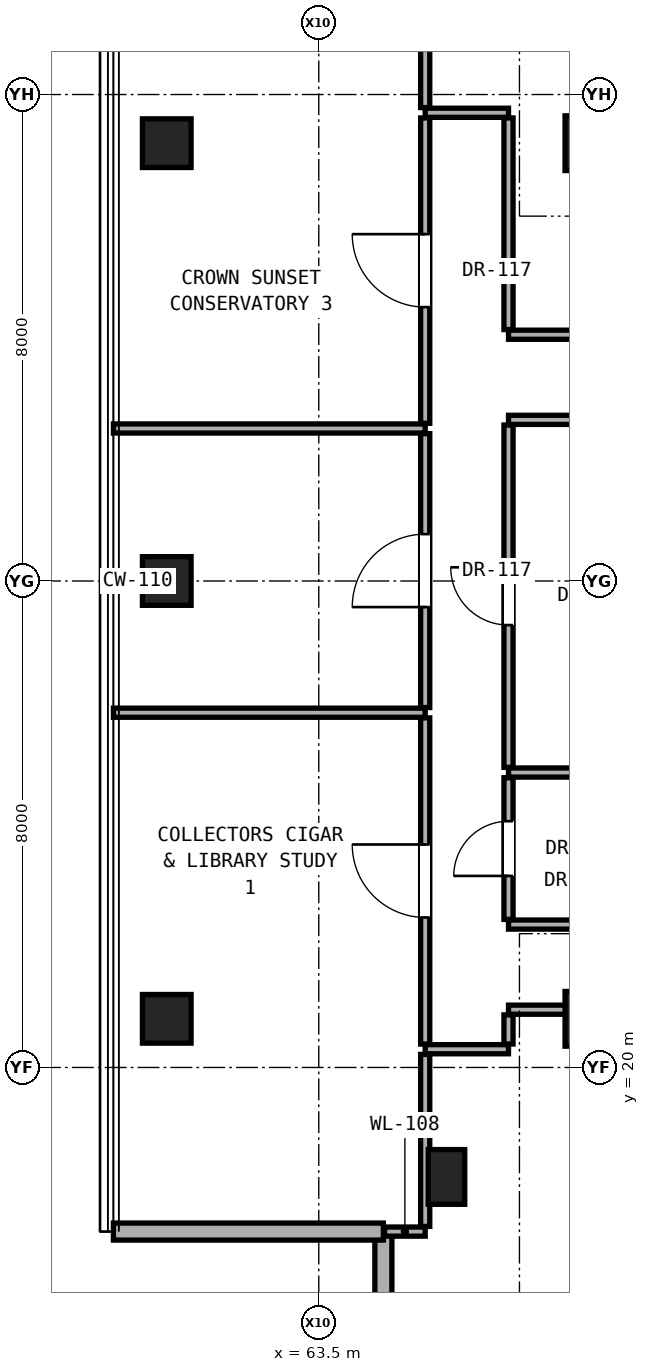
"""IFC4 building model, lengths in metres.
Left out: names, types, materials, properties, quantities, classifications, styles, units other than length and angle.
Written with IfcOpenShell. Run it as: python <this file> out.ifc"""

import sys

from ifc_helpers import new_model, si_unit, direction, frame, frame_2d, origin, origin_2d, place, context, subcontext, project, spatial, rectangle, hollow_rectangle, extrude, element, fill, save


model = new_model("IFC4")
c1 = context("Model", 3, precision=1e-05, world=origin(), true_north=direction((0.0, 1.0)))
c2 = subcontext(c1, "Body", "Model", "MODEL_VIEW")
j1 = project(units=[si_unit("LENGTHUNIT", "METRE"), si_unit("PLANEANGLEUNIT", "RADIAN")], contexts=[c1])
p1 = place(None, origin())
s1 = spatial("IfcSite", under=j1, at=p1, CompositionType="ELEMENT")
p2 = place(p1, origin())
s2 = spatial("IfcBuilding", under=s1, at=p2, CompositionType="ELEMENT")
p3 = place(p2, frame((0.0, 0.0, 206.4)))
s3 = spatial("IfcBuildingStorey", under=s2, at=p3, CompositionType="ELEMENT", Elevation=206.4)
for number, where, z_axis, x_axis in (
    (1, (68.0, 20.8, 0.0), (0.0, 0.0, 1.0), (1.0, 0.0, 0.0)),
    (2, (68.0, 35.2, 0.0), (0.0, 0.0, 1.0), (1.0, 0.0, 0.0)),
):
    element("IfcColumn", number, at=place(p3, frame(where, z_axis=z_axis, x_axis=x_axis)), inside=s3, PredefinedType="COLUMN", context=c2, shape_type="SweptSolid", body=[
        extrude(rectangle(XDim=0.9, YDim=0.9, at=origin_2d()), origin(), (0.0, 0.0, 1.0), 3.25),
    ])
for number, where, z_axis, x_axis in (
    (3, (61.0, 20.8, 0.0), (0.0, 0.0, 1.0), (1.0, 0.0, 0.0)),
    (4, (61.0, 28.0, 0.0), (0.0, 0.0, 1.0), (1.0, 0.0, 0.0)),
    (5, (61.0, 35.2, 0.0), (0.0, 0.0, 1.0), (1.0, 0.0, 0.0)),
):
    element("IfcColumn", number, at=place(p3, frame(where, z_axis=z_axis, x_axis=x_axis)), inside=s3, PredefinedType="COLUMN", context=c2, shape_type="SweptSolid", body=[
        extrude(hollow_rectangle(XDim=0.8, YDim=0.8, WallThickness=0.045, at=origin_2d()), origin(), (0.0, 0.0, 1.0), 3.25),
    ])
p4 = place(p3, frame((65.6, 18.2, 0.0), z_axis=(0.0, 0.0, 1.0), x_axis=(1.0, 0.0, 0.0)))
e6 = element("IfcColumn", 6, at=p4, inside=s3, PredefinedType="PILASTER", context=c2, shape_type="SweptSolid", body=[
    extrude(rectangle(XDim=0.6, YDim=0.9, at=origin_2d()), origin(), (0.0, 0.0, 1.0), 3.25),
])
for number, where, z_axis, x_axis in (
    (7, (64.562, 17.301, 0.0), (0.0, 0.0, 1.0), (0.0, -1.0, 0.0)),
    (8, (60.123, 17.301, 0.0), (0.0, 0.0, 1.0), (1.0, 0.0, 0.0)),
):
    element("IfcWall", number, at=place(p3, frame(where, z_axis=z_axis, x_axis=x_axis)), inside=s3, PredefinedType="SOLIDWALL", context=c2, shape_type="SweptSolid", body=[
        extrude(rectangle(XDim=4.44, YDim=0.28, at=frame_2d((2.22, 0.0))), origin(), (0.0, 0.0, 1.0), 2.58),
    ])
p5 = place(p3, frame((64.582, 17.301, 0.0), z_axis=(0.0, 0.0, 1.0), x_axis=(1.0, 0.0, 0.0)))
e9 = element("IfcWall", 9, at=p5, inside=s3, PredefinedType="PARTITIONING", context=c2, shape_type="SweptSolid", body=[
    extrude(rectangle(XDim=0.668, YDim=0.15, at=frame_2d((0.334, 0.0))), origin(), (0.0, 0.0, 1.0), 2.6),
])
p6 = place(p3, frame((65.25, 20.3, 0.0), z_axis=(0.0, 0.0, 1.0), x_axis=(1.0, 0.0, 0.0)))
e10 = element("IfcWall", 10, at=p6, inside=s3, PredefinedType="PARTITIONING", context=c2, shape_type="SweptSolid", body=[
    extrude(rectangle(XDim=1.37, YDim=0.15, at=frame_2d((0.685, 0.0))), origin(), (0.0, 0.0, 1.0), 2.6),
])
p7 = place(p3, frame((66.62, 20.95, 0.0), z_axis=(0.0, 0.0, 1.0), x_axis=(1.0, 0.0, 0.0)))
e11 = element("IfcWall", 11, at=p7, inside=s3, PredefinedType="PARTITIONING", context=c2, shape_type="SweptSolid", body=[
    extrude(rectangle(XDim=1.16, YDim=0.15, at=frame_2d((0.58, 0.0))), origin(), (0.0, 0.0, 1.0), 2.262),
])
p8 = place(p3, frame((66.62, 22.35, 0.0), z_axis=(0.0, 0.0, 1.0), x_axis=(1.0, 0.0, 0.0)))
e12 = element("IfcWall", 12, at=p8, inside=s3, PredefinedType="PARTITIONING", context=c2, shape_type="SweptSolid", body=[
    extrude(rectangle(XDim=10.14, YDim=0.15, at=frame_2d((5.07, 0.0))), origin(), (0.0, 0.0, 1.0), 2.175),
])
p9 = place(p3, frame((66.62, 24.85, 0.0), z_axis=(0.0, 0.0, 1.0), x_axis=(1.0, 0.0, 0.0)))
e13 = element("IfcWall", 13, at=p9, inside=s3, PredefinedType="PARTITIONING", context=c2, shape_type="SweptSolid", body=[
    extrude(rectangle(XDim=3.13, YDim=0.15, at=frame_2d((1.565, 0.0))), origin(), (0.0, 0.0, 1.0), 2.262),
])
for number, where, z_axis, x_axis in (
    (14, (60.123, 25.834, 0.0), (0.0, 0.0, 1.0), (1.0, 0.0, 0.0)),
    (15, (60.123, 30.508, 0.0), (0.0, 0.0, 1.0), (1.0, 0.0, 0.0)),
):
    element("IfcWall", number, at=place(p3, frame(where, z_axis=z_axis, x_axis=x_axis)), inside=s3, PredefinedType="PARTITIONING", context=c2, shape_type="SweptSolid", body=[
        extrude(rectangle(XDim=5.127, YDim=0.15, at=frame_2d((2.563, 0.0))), origin(), (0.0, 0.0, 1.0), 2.262),
    ])
p10 = place(p3, frame((66.62, 30.65, 0.0), z_axis=(0.0, 0.0, 1.0), x_axis=(1.0, 0.0, 0.0)))
e16 = element("IfcWall", 16, at=p10, inside=s3, PredefinedType="PARTITIONING", context=c2, shape_type="SweptSolid", body=[
    extrude(rectangle(XDim=10.14, YDim=0.15, at=frame_2d((5.07, 0.0))), origin(), (0.0, 0.0, 1.0), 2.175),
])
p11 = place(p10, frame((6.14, 0.0, 0.0)))
e17 = element("IfcOpeningElement", 17, at=p11, cuts=e16, PredefinedType="OPENING", context=c2, shape_type="SweptSolid", body=[
    extrude(rectangle(XDim=0.95, YDim=2.15, at=frame_2d((0.475, 1.075))), frame((0.0, 0.085, 0.0), z_axis=(0.0, -1.0, 0.0), x_axis=(1.0, 0.0, 0.0)), (0.0, 0.0, 1.0), 0.17),
])
p12 = place(p3, frame((66.62, 32.05, 0.0), z_axis=(0.0, 0.0, 1.0), x_axis=(1.0, 0.0, 0.0)))
e18 = element("IfcWall", 18, at=p12, inside=s3, PredefinedType="PARTITIONING", context=c2, shape_type="SweptSolid", body=[
    extrude(rectangle(XDim=2.18, YDim=0.15, at=frame_2d((1.09, 0.0))), origin(), (0.0, 0.0, 1.0), 2.262),
])
p13 = place(p3, frame((65.25, 35.7, 0.0), z_axis=(0.0, 0.0, 1.0), x_axis=(1.0, 0.0, 0.0)))
e19 = element("IfcWall", 19, at=p13, inside=s3, PredefinedType="PARTITIONING", context=c2, shape_type="SweptSolid", body=[
    extrude(rectangle(XDim=1.37, YDim=0.15, at=frame_2d((0.685, 0.0))), origin(), (0.0, 0.0, 1.0), 2.6),
])
p14 = place(p3, frame((65.25, 17.386, 0.0), z_axis=(0.0, 0.0, 1.0), x_axis=(0.0, 1.0, 0.0)))
e20 = element("IfcWall", 20, at=p14, inside=s3, PredefinedType="PARTITIONING", context=c2, shape_type="SweptSolid", body=[
    extrude(rectangle(XDim=2.829, YDim=0.15, at=frame_2d((1.415, 0.0))), origin(), (0.0, 0.0, 1.0), 2.043),
])
p15 = place(p3, frame((65.25, 20.385, 0.0), z_axis=(0.0, 0.0, 1.0), x_axis=(0.0, 1.0, 0.0)))
e21 = element("IfcWall", 21, at=p15, inside=s3, PredefinedType="PARTITIONING", context=c2, shape_type="SweptSolid", body=[
    extrude(rectangle(XDim=5.364, YDim=0.15, at=frame_2d((2.682, 0.0))), origin(), (0.0, 0.0, 1.0), 2.262),
])
p16 = place(p15, frame((2.082, 0.0, 0.0)))
e22 = element("IfcOpeningElement", 22, at=p16, cuts=e21, PredefinedType="OPENING", context=c2, shape_type="SweptSolid", body=[
    extrude(rectangle(XDim=1.2, YDim=2.25, at=frame_2d((0.6, 1.125))), frame((0.0, 0.085, 0.0), z_axis=(0.0, -1.0, 0.0), x_axis=(1.0, 0.0, 0.0)), (0.0, 0.0, 1.0), 0.17),
])
p17 = place(p3, frame((65.25, 25.919, 0.0), z_axis=(0.0, 0.0, 1.0), x_axis=(0.0, 1.0, 0.0)))
e23 = element("IfcWall", 23, at=p17, inside=s3, PredefinedType="PARTITIONING", context=c2, shape_type="SweptSolid", body=[
    extrude(rectangle(XDim=4.504, YDim=0.15, at=frame_2d((2.252, 0.0))), origin(), (0.0, 0.0, 1.0), 2.262),
])
p18 = place(p17, frame((1.652, 0.0, 0.0)))
e24 = element("IfcOpeningElement", 24, at=p18, cuts=e23, PredefinedType="OPENING", context=c2, shape_type="SweptSolid", body=[
    extrude(rectangle(XDim=1.2, YDim=2.25, at=frame_2d((0.6, 1.125))), frame((0.0, 0.085, 0.0), z_axis=(0.0, -1.0, 0.0), x_axis=(1.0, 0.0, 0.0)), (0.0, 0.0, 1.0), 0.17),
])
p19 = place(p3, frame((65.25, 30.593, 0.0), z_axis=(0.0, 0.0, 1.0), x_axis=(0.0, 1.0, 0.0)))
e25 = element("IfcWall", 25, at=p19, inside=s3, PredefinedType="PARTITIONING", context=c2, shape_type="SweptSolid", body=[
    extrude(rectangle(XDim=5.022, YDim=0.15, at=frame_2d((2.511, 0.0))), origin(), (0.0, 0.0, 1.0), 2.262),
])
p20 = place(p19, frame((1.911, 0.0, 0.0)))
e26 = element("IfcOpeningElement", 26, at=p20, cuts=e25, PredefinedType="OPENING", context=c2, shape_type="SweptSolid", body=[
    extrude(rectangle(XDim=1.2, YDim=2.25, at=frame_2d((0.6, 1.125))), frame((0.0, 0.085, 0.0), z_axis=(0.0, -1.0, 0.0), x_axis=(1.0, 0.0, 0.0)), (0.0, 0.0, 1.0), 0.17),
])
p21 = place(p3, frame((65.25, 35.785, 0.0), z_axis=(0.0, 0.0, 1.0), x_axis=(0.0, 1.0, 0.0)))
e27 = element("IfcWall", 27, at=p21, inside=s3, PredefinedType="PARTITIONING", context=c2, shape_type="SweptSolid", body=[
    extrude(rectangle(XDim=2.829, YDim=0.15, at=frame_2d((1.415, 0.0))), origin(), (0.0, 0.0, 1.0), 2.043),
])
p22 = place(p3, frame((66.62, 20.385, 0.0), z_axis=(0.0, 0.0, 1.0), x_axis=(0.0, 1.0, 0.0)))
e28 = element("IfcWall", 28, at=p22, inside=s3, PredefinedType="PARTITIONING", context=c2, shape_type="SweptSolid", body=[
    extrude(rectangle(XDim=0.48, YDim=0.15, at=frame_2d((0.24, 0.0))), origin(), (0.0, 0.0, 1.0), 2.262),
])
p23 = place(p3, frame((66.62, 22.435, 0.0), z_axis=(0.0, 0.0, 1.0), x_axis=(0.0, 1.0, 0.0)))
e29 = element("IfcWall", 29, at=p23, inside=s3, PredefinedType="PARTITIONING", context=c2, shape_type="SweptSolid", body=[
    extrude(rectangle(XDim=2.33, YDim=0.15, at=frame_2d((1.165, 0.0))), origin(), (0.0, 0.0, 1.0), 2.6),
])
p24 = place(p23, frame((0.715, 0.0, 0.0)))
e30 = element("IfcOpeningElement", 30, at=p24, cuts=e29, PredefinedType="OPENING", context=c2, shape_type="SweptSolid", body=[
    extrude(rectangle(XDim=0.9, YDim=2.1, at=frame_2d((0.45, 1.05))), frame((0.0, 0.085, 0.0), z_axis=(0.0, -1.0, 0.0), x_axis=(1.0, 0.0, 0.0)), (0.0, 0.0, 1.0), 0.17),
])
p25 = place(p3, frame((66.62, 24.935, 0.0), z_axis=(0.0, 0.0, 1.0), x_axis=(0.0, 1.0, 0.0)))
e31 = element("IfcWall", 31, at=p25, inside=s3, PredefinedType="PARTITIONING", context=c2, shape_type="SweptSolid", body=[
    extrude(rectangle(XDim=5.63, YDim=0.15, at=frame_2d((2.815, 0.0))), origin(), (0.0, 0.0, 1.0), 2.262),
])
p26 = place(p25, frame((2.34, 0.0, 0.0)))
e32 = element("IfcOpeningElement", 32, at=p26, cuts=e31, PredefinedType="OPENING", context=c2, shape_type="SweptSolid", body=[
    extrude(rectangle(XDim=0.95, YDim=2.15, at=frame_2d((0.475, 1.075))), frame((0.0, 0.085, 0.0), z_axis=(0.0, -1.0, 0.0), x_axis=(1.0, 0.0, 0.0)), (0.0, 0.0, 1.0), 0.17),
])
p27 = place(p3, frame((66.62, 32.135, 0.0), z_axis=(0.0, 0.0, 1.0), x_axis=(0.0, 1.0, 0.0)))
e33 = element("IfcWall", 33, at=p27, inside=s3, PredefinedType="PARTITIONING", context=c2, shape_type="SweptSolid", body=[
    extrude(rectangle(XDim=3.48, YDim=0.15, at=frame_2d((1.74, 0.0))), origin(), (0.0, 0.0, 1.0), 2.262),
])
p28 = place(p24, origin())
e34 = element("IfcDoor", 34, at=p28, inside=s3, OperationType="SINGLE_SWING_LEFT", PredefinedType="DOOR", context=c2, shape_type="SweptSolid", body=[
    extrude(rectangle(XDim=0.9, YDim=2.1, at=frame_2d((0.45, 1.05))), frame((0.0, 0.025, 0.0), z_axis=(0.0, -1.0, 0.0), x_axis=(1.0, 0.0, 0.0)), (0.0, 0.0, 1.0), 0.05),
])
fill(e30, e34)
p29 = place(p16, origin())
e35 = element("IfcDoor", 35, at=p29, inside=s3, OperationType="SINGLE_SWING_RIGHT", PredefinedType="DOOR", context=c2, shape_type="SweptSolid", body=[
    extrude(rectangle(XDim=1.2, YDim=2.25, at=frame_2d((0.6, 1.125))), frame((0.0, 0.025, 0.0), z_axis=(0.0, -1.0, 0.0), x_axis=(1.0, 0.0, 0.0)), (0.0, 0.0, 1.0), 0.05),
])
fill(e22, e35)
p30 = place(p18, origin())
e36 = element("IfcDoor", 36, at=p30, inside=s3, OperationType="SINGLE_SWING_LEFT", PredefinedType="DOOR", context=c2, shape_type="SweptSolid", body=[
    extrude(rectangle(XDim=1.2, YDim=2.25, at=frame_2d((0.6, 1.125))), frame((0.0, 0.025, 0.0), z_axis=(0.0, -1.0, 0.0), x_axis=(1.0, 0.0, 0.0)), (0.0, 0.0, 1.0), 0.05),
])
fill(e24, e36)
p31 = place(p20, origin())
e37 = element("IfcDoor", 37, at=p31, inside=s3, OperationType="SINGLE_SWING_RIGHT", PredefinedType="DOOR", context=c2, shape_type="SweptSolid", body=[
    extrude(rectangle(XDim=1.2, YDim=2.25, at=frame_2d((0.6, 1.125))), frame((0.0, 0.025, 0.0), z_axis=(0.0, -1.0, 0.0), x_axis=(1.0, 0.0, 0.0)), (0.0, 0.0, 1.0), 0.05),
])
fill(e26, e37)
p32 = place(p26, origin())
e38 = element("IfcDoor", 38, at=p32, inside=s3, OperationType="SINGLE_SWING_RIGHT", PredefinedType="DOOR", context=c2, shape_type="SweptSolid", body=[
    extrude(rectangle(XDim=0.95, YDim=2.15, at=frame_2d((0.475, 1.075))), frame((0.0, 0.025, 0.0), z_axis=(0.0, -1.0, 0.0), x_axis=(1.0, 0.0, 0.0)), (0.0, 0.0, 1.0), 0.05),
])
fill(e32, e38)
save(model, sys.argv[1])
